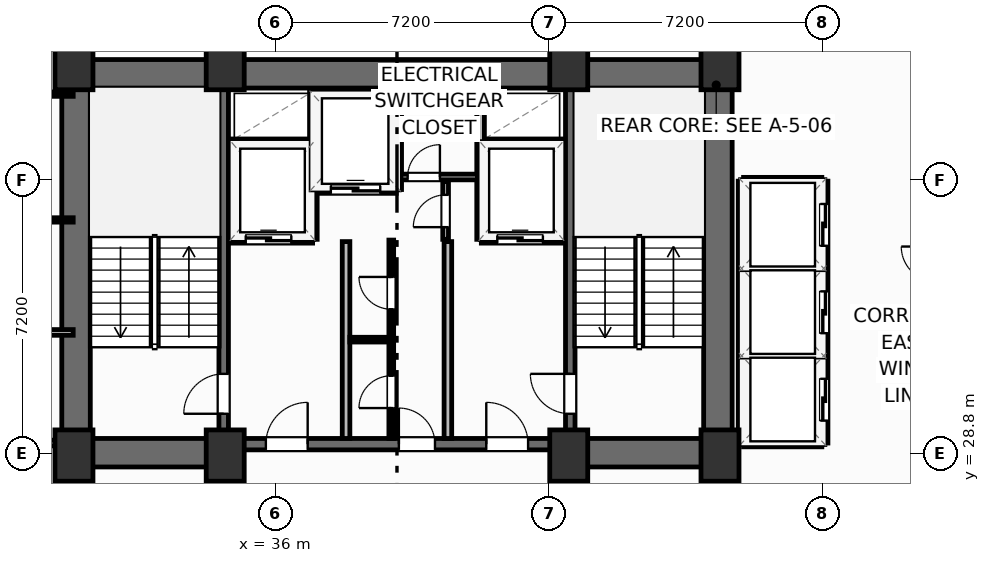
"""IFC4 building model, lengths in metres.
Left out: names, types, materials, properties, quantities, classifications, styles, units other than length and angle.
Written with IfcOpenShell. Run it as: python <this file> out.ifc"""

import sys

from ifc_helpers import new_model, si_unit, direction, frame, frame_2d, origin, origin_2d, place, context, subcontext, project, spatial, rectangle, extrude, element, fill, save


model = new_model("IFC4")
c1 = context("Model", 3, precision=1e-05, world=origin(), true_north=direction((0.0, 1.0)))
c2 = subcontext(c1, "Body", "Model", "MODEL_VIEW")
j1 = project(units=[si_unit("LENGTHUNIT", "METRE"), si_unit("PLANEANGLEUNIT", "RADIAN")], contexts=[c1])
p1 = place(None, origin())
s1 = spatial("IfcSite", under=j1, at=p1, CompositionType="ELEMENT")
p2 = place(p1, origin())
s2 = spatial("IfcBuilding", under=s1, at=p2, CompositionType="ELEMENT")
p3 = place(p2, frame((0.0, 0.0, 125.4)))
s3 = spatial("IfcBuildingStorey", under=s2, at=p3, CompositionType="ELEMENT", Elevation=125.4)
for number, where, z_axis, x_axis in (
    (1, (30.7, 28.75, 0.0), (0.0, 0.0, 1.0), (1.0, 0.0, 0.0)),
    (2, (34.68, 28.75, 0.0), (0.0, 0.0, 1.0), (1.0, 0.0, 0.0)),
    (3, (43.72, 28.75, 0.0), (0.0, 0.0, 1.0), (1.0, 0.0, 0.0)),
    (4, (47.7, 28.75, 0.0), (0.0, 0.0, 1.0), (1.0, 0.0, 0.0)),
    (5, (30.7, 39.05, 0.0), (0.0, 0.0, 1.0), (1.0, 0.0, 0.0)),
    (6, (34.68, 39.05, 0.0), (0.0, 0.0, 1.0), (1.0, 0.0, 0.0)),
    (7, (43.72, 39.05, 0.0), (0.0, 0.0, 1.0), (1.0, 0.0, 0.0)),
    (8, (47.7, 39.05, 0.0), (0.0, 0.0, 1.0), (1.0, 0.0, 0.0)),
):
    element("IfcColumn", number, at=place(p3, frame(where, z_axis=z_axis, x_axis=x_axis)), inside=s3, PredefinedType="COLUMN", context=c2, shape_type="SweptSolid", body=[
        extrude(rectangle(XDim=1.0, YDim=1.35, at=origin_2d()), origin(), (0.0, 0.0, 1.0), 3.7),
    ])
p4 = place(p3, frame((30.38, 38.795, 0.0), z_axis=(0.0, 0.0, 1.0), x_axis=(1.0, 0.0, 0.0)))
e9 = element("IfcWall", 9, at=p4, inside=s3, PredefinedType="SHEAR", context=c2, shape_type="SweptSolid", body=[
    extrude(rectangle(XDim=17.64, YDim=0.75, at=frame_2d((8.82, 0.0))), origin(), (0.0, 0.0, 1.0), 3.45),
])
for number, where, z_axis, x_axis in (
    (10, (30.755, 29.2, 0.0), (0.0, 0.0, 1.0), (0.0, 1.0, 0.0)),
    (11, (47.645, 29.2, 0.0), (0.0, 0.0, 1.0), (0.0, 1.0, 0.0)),
):
    element("IfcWall", number, at=place(p3, frame(where, z_axis=z_axis, x_axis=x_axis)), inside=s3, PredefinedType="SHEAR", context=c2, shape_type="SweptSolid", body=[
        extrude(rectangle(XDim=9.22, YDim=0.75, at=frame_2d((4.61, 0.0))), origin(), (0.0, 0.0, 1.0), 3.45),
    ])
p5 = place(p3, frame((30.38, 28.825, 0.0), z_axis=(0.0, 0.0, 1.0), x_axis=(1.0, 0.0, 0.0)))
e12 = element("IfcWall", 12, at=p5, inside=s3, PredefinedType="SHEAR", context=c2, shape_type="SweptSolid", body=[
    extrude(rectangle(XDim=4.42, YDim=0.75, at=frame_2d((2.21, 0.0))), origin(), (0.0, 0.0, 1.0), 3.45),
])
p6 = place(p3, frame((43.6, 28.825, 0.0), z_axis=(0.0, 0.0, 1.0), x_axis=(1.0, 0.0, 0.0)))
e13 = element("IfcWall", 13, at=p6, inside=s3, PredefinedType="SHEAR", context=c2, shape_type="SweptSolid", body=[
    extrude(rectangle(XDim=4.42, YDim=0.75, at=frame_2d((2.21, 0.0))), origin(), (0.0, 0.0, 1.0), 3.45),
])
p7 = place(p3, frame((34.8, 29.05, 0.0), z_axis=(0.0, 0.0, 1.0), x_axis=(1.0, 0.0, 0.0)))
e14 = element("IfcWall", 14, at=p7, inside=s3, PredefinedType="SHEAR", context=c2, shape_type="SweptSolid", body=[
    extrude(rectangle(XDim=8.8, YDim=0.3, at=frame_2d((4.4, 0.0))), origin(), (0.0, 0.0, 1.0), 3.45),
])
p8 = place(p7, frame((0.95, 0.0, 0.0)))
e15 = element("IfcOpeningElement", 15, at=p8, cuts=e14, PredefinedType="OPENING", context=c2, shape_type="SweptSolid", body=[
    extrude(rectangle(XDim=1.1, YDim=2.15, at=frame_2d((0.55, 1.075))), frame((0.0, 0.16, 0.0), z_axis=(0.0, -1.0, 0.0), x_axis=(1.0, 0.0, 0.0)), (0.0, 0.0, 1.0), 0.32),
])
p9 = place(p7, frame((6.75, 0.0, 0.0)))
e16 = element("IfcOpeningElement", 16, at=p9, cuts=e14, PredefinedType="OPENING", context=c2, shape_type="SweptSolid", body=[
    extrude(rectangle(XDim=1.1, YDim=2.15, at=frame_2d((0.55, 1.075))), frame((0.0, 0.16, 0.0), z_axis=(0.0, -1.0, 0.0), x_axis=(1.0, 0.0, 0.0)), (0.0, 0.0, 1.0), 0.32),
])
p10 = place(p7, frame((4.45, 0.0, 0.0)))
e17 = element("IfcOpeningElement", 17, at=p10, cuts=e14, PredefinedType="OPENING", context=c2, shape_type="SweptSolid", body=[
    extrude(rectangle(XDim=0.95, YDim=2.15, at=frame_2d((0.475, 1.075))), frame((0.0, 0.16, 0.0), z_axis=(0.0, -1.0, 0.0), x_axis=(1.0, 0.0, 0.0)), (0.0, 0.0, 1.0), 0.32),
])
p11 = place(p3, frame((34.64, 29.2, 0.0), z_axis=(0.0, 0.0, 1.0), x_axis=(0.0, 1.0, 0.0)))
e18 = element("IfcWall", 18, at=p11, inside=s3, PredefinedType="SHEAR", context=c2, shape_type="SweptSolid", body=[
    extrude(rectangle(XDim=9.22, YDim=0.25, at=frame_2d((4.61, 0.0))), origin(), (0.0, 0.0, 1.0), 3.45),
])
p12 = place(p11, frame((0.65, 0.0, 0.0)))
e19 = element("IfcOpeningElement", 19, at=p12, cuts=e18, PredefinedType="OPENING", context=c2, shape_type="SweptSolid", body=[
    extrude(rectangle(XDim=1.05, YDim=2.15, at=frame_2d((0.525, 1.075))), frame((0.0, 0.135, 0.0), z_axis=(0.0, -1.0, 0.0), x_axis=(1.0, 0.0, 0.0)), (0.0, 0.0, 1.0), 0.27),
])
p13 = place(p3, frame((43.76, 29.2, 0.0), z_axis=(0.0, 0.0, 1.0), x_axis=(0.0, 1.0, 0.0)))
e20 = element("IfcWall", 20, at=p13, inside=s3, PredefinedType="SHEAR", context=c2, shape_type="SweptSolid", body=[
    extrude(rectangle(XDim=9.22, YDim=0.25, at=frame_2d((4.61, 0.0))), origin(), (0.0, 0.0, 1.0), 3.45),
])
p14 = place(p13, frame((0.65, 0.0, 0.0)))
e21 = element("IfcOpeningElement", 21, at=p14, cuts=e20, PredefinedType="OPENING", context=c2, shape_type="SweptSolid", body=[
    extrude(rectangle(XDim=1.05, YDim=2.15, at=frame_2d((0.525, 1.075))), frame((0.0, 0.135, 0.0), z_axis=(0.0, -1.0, 0.0), x_axis=(1.0, 0.0, 0.0)), (0.0, 0.0, 1.0), 0.27),
])
for number, where, z_axis, x_axis in (
    (22, (37.86, 29.2, 0.0), (0.0, 0.0, 1.0), (0.0, 1.0, 0.0)),
    (23, (40.54, 29.2, 0.0), (0.0, 0.0, 1.0), (0.0, 1.0, 0.0)),
):
    element("IfcWall", number, at=place(p3, frame(where, z_axis=z_axis, x_axis=x_axis)), inside=s3, PredefinedType="PARTITIONING", context=c2, shape_type="SweptSolid", body=[
        extrude(rectangle(XDim=5.18, YDim=0.2, at=frame_2d((2.59, 0.0))), origin(), (0.0, 0.0, 1.0), 3.45),
    ])
p15 = place(p3, frame((34.8, 34.44, 0.0), z_axis=(0.0, 0.0, 1.0), x_axis=(1.0, 0.0, 0.0)))
e24 = element("IfcWall", 24, at=p15, inside=s3, PredefinedType="PARTITIONING", context=c2, shape_type="SweptSolid", body=[
    extrude(rectangle(XDim=2.18, YDim=0.2, at=frame_2d((1.09, 0.0))), origin(), (0.0, 0.0, 1.0), 3.45),
])
p16 = place(p15, frame((0.42, 0.0, 0.0)))
e25 = element("IfcOpeningElement", 25, at=p16, cuts=e24, PredefinedType="OPENING", context=c2, shape_type="SweptSolid", body=[
    extrude(rectangle(XDim=1.2, YDim=2.2, at=frame_2d((0.6, 1.1))), frame((0.0, 0.11, 0.0), z_axis=(0.0, -1.0, 0.0), x_axis=(1.0, 0.0, 0.0)), (0.0, 0.0, 1.0), 0.22),
])
p17 = place(p3, frame((34.8, 36.98, 0.0), z_axis=(0.0, 0.0, 1.0), x_axis=(1.0, 0.0, 0.0)))
e26 = element("IfcWall", 26, at=p17, inside=s3, PredefinedType="PARTITIONING", context=c2, shape_type="SweptSolid", body=[
    extrude(rectangle(XDim=2.18, YDim=0.2, at=frame_2d((1.09, 0.0))), origin(), (0.0, 0.0, 1.0), 3.45),
])
p18 = place(p3, frame((37.0, 34.44, 0.0), z_axis=(0.0, 0.0, 1.0), x_axis=(0.0, 1.0, 0.0)))
e27 = element("IfcWall", 27, at=p18, inside=s3, PredefinedType="PARTITIONING", context=c2, shape_type="SweptSolid", body=[
    extrude(rectangle(XDim=3.9, YDim=0.2, at=frame_2d((1.95, 0.0))), origin(), (0.0, 0.0, 1.0), 3.45),
])
p19 = place(p3, frame((41.42, 34.44, 0.0), z_axis=(0.0, 0.0, 1.0), x_axis=(1.0, 0.0, 0.0)))
e28 = element("IfcWall", 28, at=p19, inside=s3, PredefinedType="PARTITIONING", context=c2, shape_type="SweptSolid", body=[
    extrude(rectangle(XDim=2.18, YDim=0.2, at=frame_2d((1.09, 0.0))), origin(), (0.0, 0.0, 1.0), 3.45),
])
p20 = place(p19, frame((0.42, 0.0, 0.0)))
e29 = element("IfcOpeningElement", 29, at=p20, cuts=e28, PredefinedType="OPENING", context=c2, shape_type="SweptSolid", body=[
    extrude(rectangle(XDim=1.2, YDim=2.2, at=frame_2d((0.6, 1.1))), frame((0.0, 0.11, 0.0), z_axis=(0.0, -1.0, 0.0), x_axis=(1.0, 0.0, 0.0)), (0.0, 0.0, 1.0), 0.22),
])
p21 = place(p3, frame((41.42, 36.98, 0.0), z_axis=(0.0, 0.0, 1.0), x_axis=(1.0, 0.0, 0.0)))
e30 = element("IfcWall", 30, at=p21, inside=s3, PredefinedType="PARTITIONING", context=c2, shape_type="SweptSolid", body=[
    extrude(rectangle(XDim=2.18, YDim=0.2, at=frame_2d((1.09, 0.0))), origin(), (0.0, 0.0, 1.0), 3.45),
])
p22 = place(p3, frame((41.4, 34.44, 0.0), z_axis=(0.0, 0.0, 1.0), x_axis=(0.0, 1.0, 0.0)))
e31 = element("IfcWall", 31, at=p22, inside=s3, PredefinedType="PARTITIONING", context=c2, shape_type="SweptSolid", body=[
    extrude(rectangle(XDim=3.9, YDim=0.2, at=frame_2d((1.95, 0.0))), origin(), (0.0, 0.0, 1.0), 3.45),
])
p23 = place(p3, frame((37.06, 35.75, 0.0), z_axis=(0.0, 0.0, 1.0), x_axis=(1.0, 0.0, 0.0)))
e32 = element("IfcWall", 32, at=p23, inside=s3, PredefinedType="PARTITIONING", context=c2, shape_type="SweptSolid", body=[
    extrude(rectangle(XDim=2.12, YDim=0.2, at=frame_2d((1.06, 0.0))), origin(), (0.0, 0.0, 1.0), 3.45),
])
p24 = place(p23, frame((0.4, 0.0, 0.0)))
e33 = element("IfcOpeningElement", 33, at=p24, cuts=e32, PredefinedType="OPENING", context=c2, shape_type="SweptSolid", body=[
    extrude(rectangle(XDim=1.3, YDim=2.2, at=frame_2d((0.65, 1.1))), frame((0.0, 0.11, 0.0), z_axis=(0.0, -1.0, 0.0), x_axis=(1.0, 0.0, 0.0)), (0.0, 0.0, 1.0), 0.22),
])
p25 = place(p3, frame((39.22, 35.75, 0.0), z_axis=(0.0, 0.0, 1.0), x_axis=(0.0, 1.0, 0.0)))
e34 = element("IfcWall", 34, at=p25, inside=s3, PredefinedType="PARTITIONING", context=c2, shape_type="SweptSolid", body=[
    extrude(rectangle(XDim=2.59, YDim=0.2, at=frame_2d((1.295, 0.0))), origin(), (0.0, 0.0, 1.0), 3.45),
])
p26 = place(p3, frame((39.3, 36.08, 0.0), z_axis=(0.0, 0.0, 1.0), x_axis=(1.0, 0.0, 0.0)))
e35 = element("IfcWall", 35, at=p26, inside=s3, PredefinedType="PARTITIONING", context=c2, shape_type="SweptSolid", body=[
    extrude(rectangle(XDim=2.02, YDim=0.15, at=frame_2d((1.01, 0.0))), origin(), (0.0, 0.0, 1.0), 3.45),
])
p27 = place(p26, frame((0.18, 0.0, 0.0)))
e36 = element("IfcOpeningElement", 36, at=p27, cuts=e35, PredefinedType="OPENING", context=c2, shape_type="SweptSolid", body=[
    extrude(rectangle(XDim=0.85, YDim=2.05, at=frame_2d((0.425, 1.025))), frame((0.0, 0.085, 0.0), z_axis=(0.0, -1.0, 0.0), x_axis=(1.0, 0.0, 0.0)), (0.0, 0.0, 1.0), 0.17),
])
p28 = place(p3, frame((40.48, 34.44, 0.0), z_axis=(0.0, 0.0, 1.0), x_axis=(0.0, 1.0, 0.0)))
e37 = element("IfcWall", 37, at=p28, inside=s3, PredefinedType="PARTITIONING", context=c2, shape_type="SweptSolid", body=[
    extrude(rectangle(XDim=1.52, YDim=0.15, at=frame_2d((0.76, 0.0))), origin(), (0.0, 0.0, 1.0), 3.45),
])
p29 = place(p28, frame((0.32, 0.0, 0.0)))
e38 = element("IfcOpeningElement", 38, at=p29, cuts=e37, PredefinedType="OPENING", context=c2, shape_type="SweptSolid", body=[
    extrude(rectangle(XDim=0.85, YDim=2.05, at=frame_2d((0.425, 1.025))), frame((0.0, 0.085, 0.0), z_axis=(0.0, -1.0, 0.0), x_axis=(1.0, 0.0, 0.0)), (0.0, 0.0, 1.0), 0.17),
])
p30 = place(p3, frame((37.96, 31.8, 0.0), z_axis=(0.0, 0.0, 1.0), x_axis=(1.0, 0.0, 0.0)))
e39 = element("IfcWall", 39, at=p30, inside=s3, PredefinedType="PARTITIONING", context=c2, shape_type="SweptSolid", body=[
    extrude(rectangle(XDim=1.09, YDim=0.125, at=frame_2d((0.545, 0.0))), origin(), (0.0, 0.0, 1.0), 3.45),
])
p31 = place(p3, frame((39.05, 29.2, 0.0), z_axis=(0.0, 0.0, 1.0), x_axis=(0.0, 1.0, 0.0)))
e40 = element("IfcWall", 40, at=p31, inside=s3, PredefinedType="PARTITIONING", context=c2, shape_type="SweptSolid", body=[
    extrude(rectangle(XDim=5.22, YDim=0.125, at=frame_2d((2.61, 0.0))), origin(), (0.0, 0.0, 1.0), 3.45),
])
p32 = place(p31, frame((0.8, 0.0, 0.0)))
e41 = element("IfcOpeningElement", 41, at=p32, cuts=e40, PredefinedType="OPENING", context=c2, shape_type="SweptSolid", body=[
    extrude(rectangle(XDim=0.85, YDim=2.05, at=frame_2d((0.425, 1.025))), frame((0.0, 0.073, 0.0), z_axis=(0.0, -1.0, 0.0), x_axis=(1.0, 0.0, 0.0)), (0.0, 0.0, 1.0), 0.145),
])
p33 = place(p31, frame((3.4, 0.0, 0.0)))
e42 = element("IfcOpeningElement", 42, at=p33, cuts=e40, PredefinedType="OPENING", context=c2, shape_type="SweptSolid", body=[
    extrude(rectangle(XDim=0.85, YDim=2.05, at=frame_2d((0.425, 1.025))), frame((0.0, 0.073, 0.0), z_axis=(0.0, -1.0, 0.0), x_axis=(1.0, 0.0, 0.0)), (0.0, 0.0, 1.0), 0.145),
])
p34 = place(p3, frame((26.78, 29.08, 0.0), z_axis=(0.0, 0.0, 1.0), x_axis=(1.0, 0.0, 0.0)))
e43 = element("IfcWall", 43, at=p34, inside=s3, PredefinedType="PARTITIONING", context=c2, shape_type="SweptSolid", body=[
    extrude(rectangle(XDim=3.6, YDim=0.15, at=frame_2d((1.8, 0.0))), origin(), (0.0, 0.0, 1.0), 3.45),
])
p35 = place(p3, frame((26.8, 31.99, 0.0), z_axis=(0.0, 0.0, 1.0), x_axis=(1.0, 0.0, 0.0)))
e44 = element("IfcWall", 44, at=p35, inside=s3, PredefinedType="PARTITIONING", context=c2, shape_type="SweptSolid", body=[
    extrude(rectangle(XDim=3.88, YDim=0.15, at=frame_2d((1.94, 0.0))), origin(), (0.0, 0.0, 1.0), 3.45),
])
p36 = place(p3, frame((26.8, 34.95, 0.0), z_axis=(0.0, 0.0, 1.0), x_axis=(1.0, 0.0, 0.0)))
e45 = element("IfcWall", 45, at=p36, inside=s3, PredefinedType="PARTITIONING", context=c2, shape_type="SweptSolid", body=[
    extrude(rectangle(XDim=3.88, YDim=0.115, at=frame_2d((1.94, 0.0))), origin(), (0.0, 0.0, 1.0), 3.45),
])
p37 = place(p3, frame((26.78, 38.26, 0.0), z_axis=(0.0, 0.0, 1.0), x_axis=(1.0, 0.0, 0.0)))
e46 = element("IfcWall", 46, at=p37, inside=s3, PredefinedType="PARTITIONING", context=c2, shape_type="SweptSolid", body=[
    extrude(rectangle(XDim=3.9, YDim=0.115, at=frame_2d((1.95, 0.0))), origin(), (0.0, 0.0, 1.0), 3.45),
])
for number, where, z_axis, x_axis in (
    (47, (48.32, 31.375, 0.0), (0.0, 0.0, 1.0), (1.0, 0.0, 0.0)),
    (48, (48.32, 33.675, 0.0), (0.0, 0.0, 1.0), (1.0, 0.0, 0.0)),
):
    element("IfcWall", number, at=place(p3, frame(where, z_axis=z_axis, x_axis=x_axis)), inside=s3, PredefinedType="PARTITIONING", context=c2, shape_type="SweptSolid", body=[
        extrude(rectangle(XDim=2.06, YDim=0.2, at=frame_2d((1.03, 0.0))), origin(), (0.0, 0.0, 1.0), 3.45),
    ])
p38 = place(p3, frame((48.32, 29.08, 0.0), z_axis=(0.0, 0.0, 1.0), x_axis=(1.0, 0.0, 0.0)))
e49 = element("IfcWall", 49, at=p38, inside=s3, PredefinedType="PARTITIONING", context=c2, shape_type="SweptSolid", body=[
    extrude(rectangle(XDim=2.06, YDim=0.2, at=frame_2d((1.03, 0.0))), origin(), (0.0, 0.0, 1.0), 2.662),
])
p39 = place(p3, frame((48.32, 35.97, 0.0), z_axis=(0.0, 0.0, 1.0), x_axis=(1.0, 0.0, 0.0)))
e50 = element("IfcWall", 50, at=p39, inside=s3, PredefinedType="PARTITIONING", context=c2, shape_type="SweptSolid", body=[
    extrude(rectangle(XDim=2.06, YDim=0.2, at=frame_2d((1.03, 0.0))), origin(), (0.0, 0.0, 1.0), 3.45),
])
p40 = place(p3, frame((48.28, 29.08, 0.0), z_axis=(0.0, 0.0, 1.0), x_axis=(0.0, 1.0, 0.0)))
e51 = element("IfcWall", 51, at=p40, inside=s3, PredefinedType="PARTITIONING", context=c2, shape_type="SweptSolid", body=[
    extrude(rectangle(XDim=6.89, YDim=0.2, at=frame_2d((3.445, 0.0))), origin(), (0.0, 0.0, 1.0), 3.45),
])
p41 = place(p3, frame((50.44, 29.08, 0.0), z_axis=(0.0, 0.0, 1.0), x_axis=(0.0, 1.0, 0.0)))
e52 = element("IfcWall", 52, at=p41, inside=s3, PredefinedType="PARTITIONING", context=c2, shape_type="SweptSolid", body=[
    extrude(rectangle(XDim=6.89, YDim=0.2, at=frame_2d((3.445, 0.0))), origin(), (0.0, 0.0, 1.0), 3.45),
])
p42 = place(p41, frame((0.59, 0.0, 0.0)))
e53 = element("IfcOpeningElement", 53, at=p42, cuts=e52, PredefinedType="OPENING", context=c2, shape_type="SweptSolid", body=[
    extrude(rectangle(XDim=1.1, YDim=2.15, at=frame_2d((0.55, 1.075))), frame((0.0, 0.11, 0.0), z_axis=(0.0, -1.0, 0.0), x_axis=(1.0, 0.0, 0.0)), (0.0, 0.0, 1.0), 0.22),
])
p43 = place(p41, frame((2.89, 0.0, 0.0)))
e54 = element("IfcOpeningElement", 54, at=p43, cuts=e52, PredefinedType="OPENING", context=c2, shape_type="SweptSolid", body=[
    extrude(rectangle(XDim=1.1, YDim=2.15, at=frame_2d((0.55, 1.075))), frame((0.0, 0.11, 0.0), z_axis=(0.0, -1.0, 0.0), x_axis=(1.0, 0.0, 0.0)), (0.0, 0.0, 1.0), 0.22),
])
p44 = place(p41, frame((5.19, 0.0, 0.0)))
e55 = element("IfcOpeningElement", 55, at=p44, cuts=e52, PredefinedType="OPENING", context=c2, shape_type="SweptSolid", body=[
    extrude(rectangle(XDim=1.1, YDim=2.15, at=frame_2d((0.55, 1.075))), frame((0.0, 0.11, 0.0), z_axis=(0.0, -1.0, 0.0), x_axis=(1.0, 0.0, 0.0)), (0.0, 0.0, 1.0), 0.22),
])
p45 = place(p12, origin())
e56 = element("IfcDoor", 56, at=p45, inside=s3, OperationType="SINGLE_SWING_LEFT", PredefinedType="DOOR", context=c2, shape_type="SweptSolid", body=[
    extrude(rectangle(XDim=1.05, YDim=2.15, at=frame_2d((0.525, 1.075))), frame((0.0, 0.025, 0.0), z_axis=(0.0, -1.0, 0.0), x_axis=(1.0, 0.0, 0.0)), (0.0, 0.0, 1.0), 0.05),
])
fill(e19, e56)
p46 = place(p14, origin())
e57 = element("IfcDoor", 57, at=p46, inside=s3, OperationType="SINGLE_SWING_RIGHT", PredefinedType="DOOR", context=c2, shape_type="SweptSolid", body=[
    extrude(rectangle(XDim=1.05, YDim=2.15, at=frame_2d((0.525, 1.075))), frame((0.0, 0.025, 0.0), z_axis=(0.0, -1.0, 0.0), x_axis=(1.0, 0.0, 0.0)), (0.0, 0.0, 1.0), 0.05),
])
fill(e21, e57)
p47 = place(p8, origin())
e58 = element("IfcDoor", 58, at=p47, inside=s3, OperationType="SINGLE_SWING_RIGHT", PredefinedType="DOOR", context=c2, shape_type="SweptSolid", body=[
    extrude(rectangle(XDim=1.1, YDim=2.15, at=frame_2d((0.55, 1.075))), frame((0.0, 0.025, 0.0), z_axis=(0.0, -1.0, 0.0), x_axis=(1.0, 0.0, 0.0)), (0.0, 0.0, 1.0), 0.05),
])
fill(e15, e58)
p48 = place(p9, origin())
e59 = element("IfcDoor", 59, at=p48, inside=s3, OperationType="SINGLE_SWING_LEFT", PredefinedType="DOOR", context=c2, shape_type="SweptSolid", body=[
    extrude(rectangle(XDim=1.1, YDim=2.15, at=frame_2d((0.55, 1.075))), frame((0.0, 0.025, 0.0), z_axis=(0.0, -1.0, 0.0), x_axis=(1.0, 0.0, 0.0)), (0.0, 0.0, 1.0), 0.05),
])
fill(e16, e59)
p49 = place(p16, origin())
e60 = element("IfcDoor", 60, at=p49, inside=s3, OperationType="SLIDING_TO_LEFT", PredefinedType="DOOR", context=c2, shape_type="SweptSolid", body=[
    extrude(rectangle(XDim=1.2, YDim=2.2, at=frame_2d((0.6, 1.1))), frame((0.0, 0.025, 0.0), z_axis=(0.0, -1.0, 0.0), x_axis=(1.0, 0.0, 0.0)), (0.0, 0.0, 1.0), 0.05),
])
fill(e25, e60)
p50 = place(p20, origin())
e61 = element("IfcDoor", 61, at=p50, inside=s3, OperationType="SLIDING_TO_LEFT", PredefinedType="DOOR", context=c2, shape_type="SweptSolid", body=[
    extrude(rectangle(XDim=1.2, YDim=2.2, at=frame_2d((0.6, 1.1))), frame((0.0, 0.025, 0.0), z_axis=(0.0, -1.0, 0.0), x_axis=(1.0, 0.0, 0.0)), (0.0, 0.0, 1.0), 0.05),
])
fill(e29, e61)
p51 = place(p24, origin())
e62 = element("IfcDoor", 62, at=p51, inside=s3, OperationType="SLIDING_TO_LEFT", PredefinedType="DOOR", context=c2, shape_type="SweptSolid", body=[
    extrude(rectangle(XDim=1.3, YDim=2.2, at=frame_2d((0.65, 1.1))), frame((0.0, 0.025, 0.0), z_axis=(0.0, -1.0, 0.0), x_axis=(1.0, 0.0, 0.0)), (0.0, 0.0, 1.0), 0.05),
])
fill(e33, e62)
p52 = place(p27, origin())
e63 = element("IfcDoor", 63, at=p52, inside=s3, OperationType="SINGLE_SWING_RIGHT", PredefinedType="DOOR", context=c2, shape_type="SweptSolid", body=[
    extrude(rectangle(XDim=0.85, YDim=2.05, at=frame_2d((0.425, 1.025))), frame((0.0, 0.025, 0.0), z_axis=(0.0, -1.0, 0.0), x_axis=(1.0, 0.0, 0.0)), (0.0, 0.0, 1.0), 0.05),
])
fill(e36, e63)
p53 = place(p29, origin())
e64 = element("IfcDoor", 64, at=p53, inside=s3, OperationType="SINGLE_SWING_LEFT", PredefinedType="DOOR", context=c2, shape_type="SweptSolid", body=[
    extrude(rectangle(XDim=0.85, YDim=2.05, at=frame_2d((0.425, 1.025))), frame((0.0, 0.025, 0.0), z_axis=(0.0, -1.0, 0.0), x_axis=(1.0, 0.0, 0.0)), (0.0, 0.0, 1.0), 0.05),
])
fill(e38, e64)
p54 = place(p32, origin())
e65 = element("IfcDoor", 65, at=p54, inside=s3, OperationType="SINGLE_SWING_LEFT", PredefinedType="DOOR", context=c2, shape_type="SweptSolid", body=[
    extrude(rectangle(XDim=0.85, YDim=2.05, at=frame_2d((0.425, 1.025))), frame((0.0, 0.025, 0.0), z_axis=(0.0, -1.0, 0.0), x_axis=(1.0, 0.0, 0.0)), (0.0, 0.0, 1.0), 0.05),
])
fill(e41, e65)
p55 = place(p33, origin())
e66 = element("IfcDoor", 66, at=p55, inside=s3, OperationType="SINGLE_SWING_RIGHT", PredefinedType="DOOR", context=c2, shape_type="SweptSolid", body=[
    extrude(rectangle(XDim=0.85, YDim=2.05, at=frame_2d((0.425, 1.025))), frame((0.0, 0.025, 0.0), z_axis=(0.0, -1.0, 0.0), x_axis=(1.0, 0.0, 0.0)), (0.0, 0.0, 1.0), 0.05),
])
fill(e42, e66)
p56 = place(p10, origin())
e67 = element("IfcDoor", 67, at=p56, inside=s3, OperationType="SINGLE_SWING_LEFT", PredefinedType="DOOR", context=c2, shape_type="SweptSolid", body=[
    extrude(rectangle(XDim=0.95, YDim=2.15, at=frame_2d((0.475, 1.075))), frame((0.0, 0.025, 0.0), z_axis=(0.0, -1.0, 0.0), x_axis=(1.0, 0.0, 0.0)), (0.0, 0.0, 1.0), 0.05),
])
fill(e17, e67)
p57 = place(p42, origin())
e68 = element("IfcDoor", 68, at=p57, inside=s3, OperationType="SLIDING_TO_LEFT", PredefinedType="DOOR", context=c2, shape_type="SweptSolid", body=[
    extrude(rectangle(XDim=1.1, YDim=2.15, at=frame_2d((0.55, 1.075))), frame((0.0, 0.025, 0.0), z_axis=(0.0, -1.0, 0.0), x_axis=(1.0, 0.0, 0.0)), (0.0, 0.0, 1.0), 0.05),
])
fill(e53, e68)
p58 = place(p43, origin())
e69 = element("IfcDoor", 69, at=p58, inside=s3, OperationType="SLIDING_TO_LEFT", PredefinedType="DOOR", context=c2, shape_type="SweptSolid", body=[
    extrude(rectangle(XDim=1.1, YDim=2.15, at=frame_2d((0.55, 1.075))), frame((0.0, 0.025, 0.0), z_axis=(0.0, -1.0, 0.0), x_axis=(1.0, 0.0, 0.0)), (0.0, 0.0, 1.0), 0.05),
])
fill(e54, e69)
p59 = place(p44, origin())
e70 = element("IfcDoor", 70, at=p59, inside=s3, OperationType="SLIDING_TO_LEFT", PredefinedType="DOOR", context=c2, shape_type="SweptSolid", body=[
    extrude(rectangle(XDim=1.1, YDim=2.15, at=frame_2d((0.55, 1.075))), frame((0.0, 0.025, 0.0), z_axis=(0.0, -1.0, 0.0), x_axis=(1.0, 0.0, 0.0)), (0.0, 0.0, 1.0), 0.05),
])
fill(e55, e70)
save(model, sys.argv[1])
